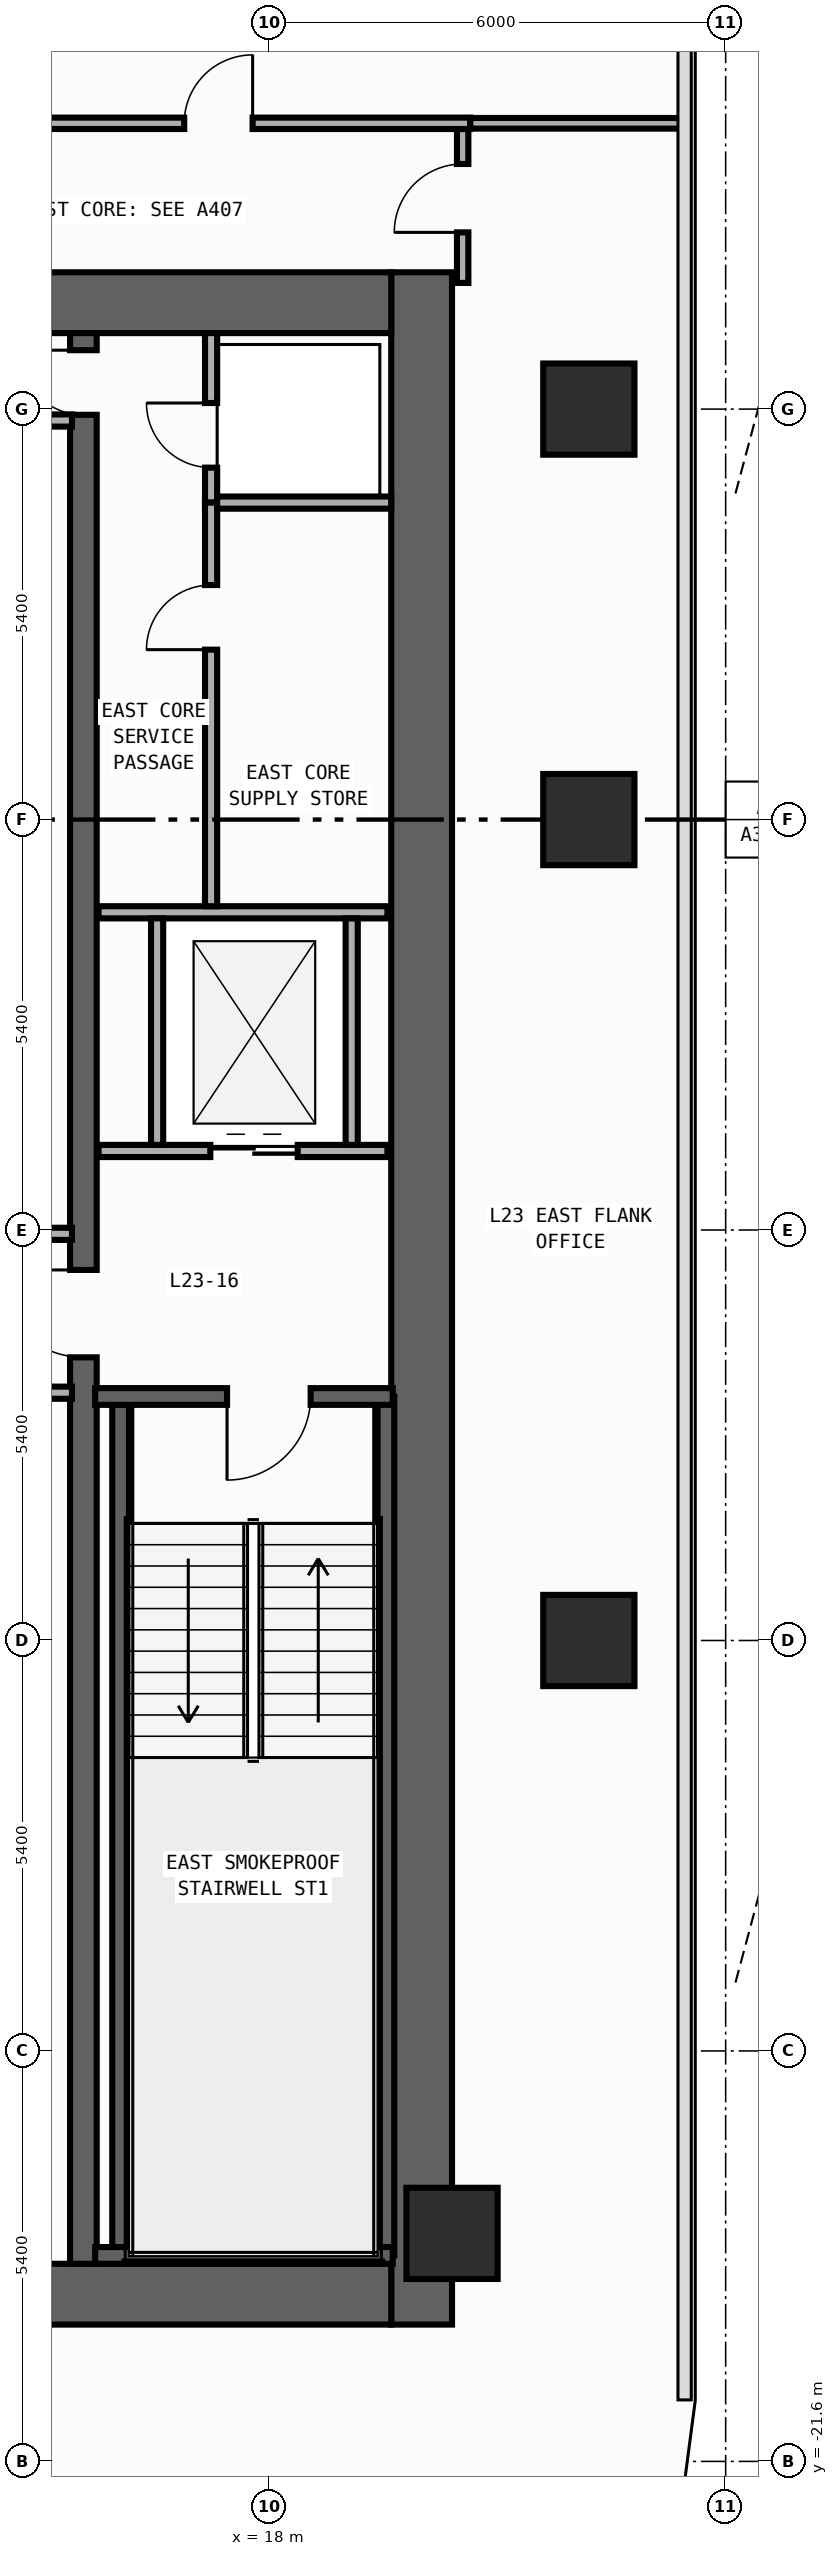
"""IFC4 building model, lengths in metres.
Left out: names, types, materials, properties, quantities, classifications, styles, units other than length and angle.
Written with IfcOpenShell. Run it as: python <this file> out.ifc"""

import sys

from ifc_helpers import new_model, si_unit, direction, frame, frame_2d, origin, origin_2d, place, context, subcontext, project, spatial, rectangle, extrude, element, fill, save


model = new_model("IFC4")
c1 = context("Model", 3, precision=1e-05, world=origin(), true_north=direction((0.0, 1.0)))
c2 = subcontext(c1, "Body", "Model", "MODEL_VIEW")
j1 = project(units=[si_unit("LENGTHUNIT", "METRE"), si_unit("PLANEANGLEUNIT", "RADIAN")], contexts=[c1])
p1 = place(None, origin())
s1 = spatial("IfcSite", under=j1, at=p1, CompositionType="ELEMENT")
p2 = place(p1, origin())
s2 = spatial("IfcBuilding", under=s1, at=p2, CompositionType="ELEMENT")
p3 = place(p2, frame((0.0, 0.0, 101.6)))
s3 = spatial("IfcBuildingStorey", under=s2, at=p3, CompositionType="ELEMENT", Elevation=101.6)
p4 = place(p3, frame((20.0, -19.8, 0.0), z_axis=(0.0, 0.0, 1.0), x_axis=(0.0, 1.0, 0.0)))
e1 = element("IfcWall", 1, at=p4, inside=s3, PredefinedType="SHEAR", context=c2, shape_type="SweptSolid", body=[
    extrude(rectangle(XDim=27.0, YDim=0.8, at=frame_2d((13.5, 0.0))), origin(), (0.0, 0.0, 1.0), 3.94),
])
for number, where, z_axis, x_axis in (
    (2, (12.8, -19.4, 0.0), (0.0, 0.0, 1.0), (1.0, 0.0, 0.0)),
    (3, (12.8, 6.8, 0.0), (0.0, 0.0, 1.0), (1.0, 0.0, 0.0)),
):
    element("IfcWall", number, at=place(p3, frame(where, z_axis=z_axis, x_axis=x_axis)), inside=s3, PredefinedType="SHEAR", context=c2, shape_type="SweptSolid", body=[
        extrude(rectangle(XDim=6.8, YDim=0.8, at=frame_2d((3.4, 0.0))), origin(), (0.0, 0.0, 1.0), 3.94),
    ])
p5 = place(p3, frame((15.55, -19.0, 0.0), z_axis=(0.0, 0.0, 1.0), x_axis=(0.0, 1.0, 0.0)))
e4 = element("IfcWall", 4, at=p5, inside=s3, PredefinedType="SHEAR", context=c2, shape_type="SweptSolid", body=[
    extrude(rectangle(XDim=25.4, YDim=0.35, at=frame_2d((12.7, 0.0))), origin(), (0.0, 0.0, 1.0), 3.94),
])
p6 = place(p5, frame((11.925, 0.0, 0.0)))
e5 = element("IfcOpeningElement", 5, at=p6, cuts=e4, PredefinedType="OPENING", context=c2, shape_type="SweptSolid", body=[
    extrude(rectangle(XDim=1.15, YDim=2.2, at=frame_2d((0.575, 1.1))), frame((0.0, 0.185, 0.0), z_axis=(0.0, -1.0, 0.0), x_axis=(1.0, 0.0, 0.0)), (0.0, 0.0, 1.0), 0.37),
])
p7 = place(p5, frame((24.325, 0.0, 0.0)))
e6 = element("IfcOpeningElement", 6, at=p7, cuts=e4, PredefinedType="OPENING", context=c2, shape_type="SweptSolid", body=[
    extrude(rectangle(XDim=0.85, YDim=2.1, at=frame_2d((0.425, 1.05))), frame((0.0, 0.185, 0.0), z_axis=(0.0, -1.0, 0.0), x_axis=(1.0, 0.0, 0.0)), (0.0, 0.0, 1.0), 0.37),
])
for number, where, z_axis, x_axis in (
    (7, (16.04, -18.89, 0.0), (0.0, 0.0, 1.0), (0.0, 1.0, 0.0)),
    (8, (19.53, -18.89, 0.0), (0.0, 0.0, 1.0), (0.0, 1.0, 0.0)),
):
    element("IfcWall", number, at=place(p3, frame(where, z_axis=z_axis, x_axis=x_axis)), inside=s3, PredefinedType="SHEAR", context=c2, shape_type="SweptSolid", body=[
        extrude(rectangle(XDim=11.3, YDim=0.22, at=frame_2d((5.65, 0.0))), origin(), (0.0, 0.0, 1.0), 3.94),
    ])
p8 = place(p3, frame((15.705, -18.89, 0.0), z_axis=(0.0, 0.0, 1.0), x_axis=(1.0, 0.0, 0.0)))
e9 = element("IfcWall", 9, at=p8, inside=s3, PredefinedType="SHEAR", context=c2, shape_type="SweptSolid", body=[
    extrude(rectangle(XDim=3.915, YDim=0.22, at=frame_2d((1.958, 0.0))), origin(), (0.0, 0.0, 1.0), 3.94),
])
p9 = place(p3, frame((19.62, -7.59, 0.0), z_axis=(0.0, 0.0, 1.0), x_axis=(-1.0, 0.0, 0.0)))
e10 = element("IfcWall", 10, at=p9, inside=s3, PredefinedType="SHEAR", context=c2, shape_type="SweptSolid", body=[
    extrude(rectangle(XDim=3.915, YDim=0.22, at=frame_2d((1.958, 0.0))), origin(), (0.0, 0.0, 1.0), 3.94),
])
p10 = place(p9, frame((1.08, 0.0, 0.0)))
e11 = element("IfcOpeningElement", 11, at=p10, cuts=e10, PredefinedType="OPENING", context=c2, shape_type="SweptSolid", body=[
    extrude(rectangle(XDim=1.1, YDim=2.2, at=frame_2d((0.55, 1.1))), frame((0.0, 0.12, 0.0), z_axis=(0.0, -1.0, 0.0), x_axis=(1.0, 0.0, 0.0)), (0.0, 0.0, 1.0), 0.24),
])
for number, where, z_axis, x_axis in (
    (12, (20.4, -18.6, 0.0), (0.0, 0.0, 1.0), (1.0, 0.0, 0.0)),
    (13, (22.2, -10.8, 0.0), (0.0, 0.0, 1.0), (1.0, 0.0, 0.0)),
    (14, (22.2, 0.0, 0.0), (0.0, 0.0, 1.0), (1.0, 0.0, 0.0)),
    (15, (22.2, 5.4, 0.0), (0.0, 0.0, 1.0), (1.0, 0.0, 0.0)),
):
    element("IfcColumn", number, at=place(p3, frame(where, z_axis=z_axis, x_axis=x_axis)), inside=s3, PredefinedType="COLUMN", context=c2, shape_type="SweptSolid", body=[
        extrude(rectangle(XDim=1.2, YDim=1.2, at=origin_2d()), origin(), (0.0, 0.0, 1.0), 4.2),
    ])
p11 = place(p3, frame((15.75, -4.36, 0.0), z_axis=(0.0, 0.0, 1.0), x_axis=(1.0, 0.0, 0.0)))
e16 = element("IfcWall", 16, at=p11, inside=s3, PredefinedType="STANDARD", context=c2, shape_type="SweptSolid", body=[
    extrude(rectangle(XDim=3.8, YDim=0.16, at=frame_2d((1.9, 0.0))), origin(), (0.0, 0.0, 1.0), 3.94),
])
p12 = place(p11, frame((1.47, 0.0, 0.0)))
e17 = element("IfcOpeningElement", 17, at=p12, cuts=e16, PredefinedType="OPENING", context=c2, shape_type="SweptSolid", body=[
    extrude(rectangle(XDim=1.15, YDim=2.2, at=frame_2d((0.575, 1.1))), frame((0.0, 0.09, 0.0), z_axis=(0.0, -1.0, 0.0), x_axis=(1.0, 0.0, 0.0)), (0.0, 0.0, 1.0), 0.18),
])
p13 = place(p3, frame((15.75, -1.22, 0.0), z_axis=(0.0, 0.0, 1.0), x_axis=(1.0, 0.0, 0.0)))
e18 = element("IfcWall", 18, at=p13, inside=s3, PredefinedType="STANDARD", context=c2, shape_type="SweptSolid", body=[
    extrude(rectangle(XDim=3.8, YDim=0.16, at=frame_2d((1.9, 0.0))), origin(), (0.0, 0.0, 1.0), 3.94),
])
for number, where, z_axis, x_axis in (
    (19, (16.52, -4.28, 0.0), (0.0, 0.0, 1.0), (0.0, 1.0, 0.0)),
    (20, (19.08, -4.28, 0.0), (0.0, 0.0, 1.0), (0.0, 1.0, 0.0)),
):
    element("IfcWall", number, at=place(p3, frame(where, z_axis=z_axis, x_axis=x_axis)), inside=s3, PredefinedType="STANDARD", context=c2, shape_type="SweptSolid", body=[
        extrude(rectangle(XDim=2.98, YDim=0.16, at=frame_2d((1.49, 0.0))), origin(), (0.0, 0.0, 1.0), 3.94),
    ])
for number, where, z_axis, x_axis in (
    (21, (12.8, -5.45, 0.0), (0.0, 0.0, 1.0), (1.0, 0.0, 0.0)),
    (22, (12.8, -7.54, 0.0), (0.0, 0.0, 1.0), (1.0, 0.0, 0.0)),
    (23, (12.8, 5.25, 0.0), (0.0, 0.0, 1.0), (1.0, 0.0, 0.0)),
):
    element("IfcWall", number, at=place(p3, frame(where, z_axis=z_axis, x_axis=x_axis)), inside=s3, PredefinedType="STANDARD", context=c2, shape_type="SweptSolid", body=[
        extrude(rectangle(XDim=2.6, YDim=0.16, at=frame_2d((1.3, 0.0))), origin(), (0.0, 0.0, 1.0), 3.94),
    ])
p14 = place(p3, frame((17.23, 4.17, 0.0), z_axis=(0.0, 0.0, 1.0), x_axis=(0.0, 1.0, 0.0)))
e24 = element("IfcWall", 24, at=p14, inside=s3, PredefinedType="PARTITIONING", context=c2, shape_type="SweptSolid", body=[
    extrude(rectangle(XDim=2.23, YDim=0.16, at=frame_2d((1.115, 0.0))), origin(), (0.0, 0.0, 1.0), 3.94),
])
p15 = place(p14, frame((0.46, 0.0, 0.0)))
e25 = element("IfcOpeningElement", 25, at=p15, cuts=e24, PredefinedType="OPENING", context=c2, shape_type="SweptSolid", body=[
    extrude(rectangle(XDim=0.85, YDim=2.1, at=frame_2d((0.425, 1.05))), frame((0.0, 0.09, 0.0), z_axis=(0.0, -1.0, 0.0), x_axis=(1.0, 0.0, 0.0)), (0.0, 0.0, 1.0), 0.18),
])
p16 = place(p3, frame((17.23, -1.14, 0.0), z_axis=(0.0, 0.0, 1.0), x_axis=(0.0, 1.0, 0.0)))
e26 = element("IfcWall", 26, at=p16, inside=s3, PredefinedType="PARTITIONING", context=c2, shape_type="SweptSolid", body=[
    extrude(rectangle(XDim=5.31, YDim=0.16, at=frame_2d((2.655, 0.0))), origin(), (0.0, 0.0, 1.0), 3.94),
])
p17 = place(p16, frame((3.375, 0.0, 0.0)))
e27 = element("IfcOpeningElement", 27, at=p17, cuts=e26, PredefinedType="OPENING", context=c2, shape_type="SweptSolid", body=[
    extrude(rectangle(XDim=0.85, YDim=2.1, at=frame_2d((0.425, 1.05))), frame((0.0, 0.09, 0.0), z_axis=(0.0, -1.0, 0.0), x_axis=(1.0, 0.0, 0.0)), (0.0, 0.0, 1.0), 0.18),
])
p18 = place(p3, frame((17.31, 4.17, 0.0), z_axis=(0.0, 0.0, 1.0), x_axis=(1.0, 0.0, 0.0)))
e28 = element("IfcWall", 28, at=p18, inside=s3, PredefinedType="PARTITIONING", context=c2, shape_type="SweptSolid", body=[
    extrude(rectangle(XDim=2.29, YDim=0.16, at=frame_2d((1.145, 0.0))), origin(), (0.0, 0.0, 1.0), 3.94),
])
p19 = place(p3, frame((20.54, 7.06, 0.0), z_axis=(0.0, 0.0, 1.0), x_axis=(0.0, 1.0, 0.0)))
e29 = element("IfcWall", 29, at=p19, inside=s3, PredefinedType="PARTITIONING", context=c2, shape_type="SweptSolid", body=[
    extrude(rectangle(XDim=2.025, YDim=0.15, at=frame_2d((1.012, 0.0))), origin(), (0.0, 0.0, 1.0), 3.94),
])
p20 = place(p19, frame((0.665, 0.0, 0.0)))
e30 = element("IfcOpeningElement", 30, at=p20, cuts=e29, PredefinedType="OPENING", context=c2, shape_type="SweptSolid", body=[
    extrude(rectangle(XDim=0.9, YDim=2.15, at=frame_2d((0.45, 1.075))), frame((0.0, 0.085, 0.0), z_axis=(0.0, -1.0, 0.0), x_axis=(1.0, 0.0, 0.0)), (0.0, 0.0, 1.0), 0.17),
])
p21 = place(p3, frame((11.81, 9.16, 0.0), z_axis=(0.0, 0.0, 1.0), x_axis=(1.0, 0.0, 0.0)))
e31 = element("IfcWall", 31, at=p21, inside=s3, PredefinedType="PARTITIONING", context=c2, shape_type="SweptSolid", body=[
    extrude(rectangle(XDim=8.83, YDim=0.15, at=frame_2d((4.415, 0.0))), origin(), (0.0, 0.0, 1.0), 3.94),
])
p22 = place(p21, frame((5.067, 0.0, 0.0)))
e32 = element("IfcOpeningElement", 32, at=p22, cuts=e31, PredefinedType="OPENING", context=c2, shape_type="SweptSolid", body=[
    extrude(rectangle(XDim=0.9, YDim=2.15, at=frame_2d((0.45, 1.075))), frame((0.0, 0.085, 0.0), z_axis=(0.0, -1.0, 0.0), x_axis=(1.0, 0.0, 0.0)), (0.0, 0.0, 1.0), 0.17),
])
p23 = place(p3, frame((20.64, 9.16, 0.0), z_axis=(0.0, 0.0, 1.0), x_axis=(1.0, 0.0, 0.0)))
e33 = element("IfcWall", 33, at=p23, inside=s3, PredefinedType="PARTITIONING", context=c2, shape_type="SweptSolid", body=[
    extrude(rectangle(XDim=2.815, YDim=0.14, at=frame_2d((1.408, 0.0))), origin(), (0.0, 0.0, 1.0), 3.94),
])
p24 = place(p10, origin())
e34 = element("IfcDoor", 34, at=p24, inside=s3, OperationType="SINGLE_SWING_RIGHT", PredefinedType="DOOR", context=c2, shape_type="SweptSolid", body=[
    extrude(rectangle(XDim=1.1, YDim=2.2, at=frame_2d((0.55, 1.1))), frame((0.0, 0.025, 0.0), z_axis=(0.0, -1.0, 0.0), x_axis=(1.0, 0.0, 0.0)), (0.0, 0.0, 1.0), 0.05),
])
fill(e11, e34)
p25 = place(p6, origin())
e35 = element("IfcDoor", 35, at=p25, inside=s3, OperationType="SINGLE_SWING_RIGHT", PredefinedType="DOOR", context=c2, shape_type="SweptSolid", body=[
    extrude(rectangle(XDim=1.15, YDim=2.2, at=frame_2d((0.575, 1.1))), frame((0.0, 0.025, 0.0), z_axis=(0.0, -1.0, 0.0), x_axis=(1.0, 0.0, 0.0)), (0.0, 0.0, 1.0), 0.05),
])
fill(e5, e35)
p26 = place(p7, origin())
e36 = element("IfcDoor", 36, at=p26, inside=s3, OperationType="SINGLE_SWING_RIGHT", PredefinedType="DOOR", context=c2, shape_type="SweptSolid", body=[
    extrude(rectangle(XDim=0.85, YDim=2.1, at=frame_2d((0.425, 1.05))), frame((0.0, 0.025, 0.0), z_axis=(0.0, -1.0, 0.0), x_axis=(1.0, 0.0, 0.0)), (0.0, 0.0, 1.0), 0.05),
])
fill(e6, e36)
p27 = place(p12, origin())
e37 = element("IfcDoor", 37, at=p27, inside=s3, OperationType="DOUBLE_DOOR_SLIDING", PredefinedType="DOOR", context=c2, shape_type="SweptSolid", body=[
    extrude(rectangle(XDim=1.15, YDim=2.2, at=frame_2d((0.575, 1.1))), frame((0.0, 0.025, 0.0), z_axis=(0.0, -1.0, 0.0), x_axis=(1.0, 0.0, 0.0)), (0.0, 0.0, 1.0), 0.05),
])
fill(e17, e37)
p28 = place(p15, origin())
e38 = element("IfcDoor", 38, at=p28, inside=s3, OperationType="SINGLE_SWING_RIGHT", PredefinedType="DOOR", context=c2, shape_type="SweptSolid", body=[
    extrude(rectangle(XDim=0.85, YDim=2.1, at=frame_2d((0.425, 1.05))), frame((0.0, 0.025, 0.0), z_axis=(0.0, -1.0, 0.0), x_axis=(1.0, 0.0, 0.0)), (0.0, 0.0, 1.0), 0.05),
])
fill(e25, e38)
p29 = place(p17, origin())
e39 = element("IfcDoor", 39, at=p29, inside=s3, OperationType="SINGLE_SWING_LEFT", PredefinedType="DOOR", context=c2, shape_type="SweptSolid", body=[
    extrude(rectangle(XDim=0.85, YDim=2.1, at=frame_2d((0.425, 1.05))), frame((0.0, 0.025, 0.0), z_axis=(0.0, -1.0, 0.0), x_axis=(1.0, 0.0, 0.0)), (0.0, 0.0, 1.0), 0.05),
])
fill(e27, e39)
p30 = place(p20, origin())
e40 = element("IfcDoor", 40, at=p30, inside=s3, OperationType="SINGLE_SWING_LEFT", PredefinedType="DOOR", context=c2, shape_type="SweptSolid", body=[
    extrude(rectangle(XDim=0.9, YDim=2.15, at=frame_2d((0.45, 1.075))), frame((0.0, 0.025, 0.0), z_axis=(0.0, -1.0, 0.0), x_axis=(1.0, 0.0, 0.0)), (0.0, 0.0, 1.0), 0.05),
])
fill(e30, e40)
p31 = place(p22, origin())
e41 = element("IfcDoor", 41, at=p31, inside=s3, OperationType="SINGLE_SWING_RIGHT", PredefinedType="DOOR", context=c2, shape_type="SweptSolid", body=[
    extrude(rectangle(XDim=0.9, YDim=2.15, at=frame_2d((0.45, 1.075))), frame((0.0, 0.025, 0.0), z_axis=(0.0, -1.0, 0.0), x_axis=(1.0, 0.0, 0.0)), (0.0, 0.0, 1.0), 0.05),
])
fill(e32, e41)
save(model, sys.argv[1])
